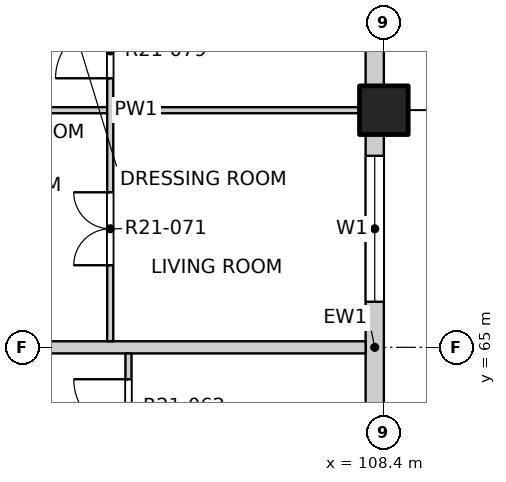
"""IFC4 building model, lengths in metres.
Left out: names, types, materials, properties, quantities, classifications, styles, units other than length and angle.
Written with IfcOpenShell. Run it as: python <this file> out.ifc"""

import sys

from ifc_helpers import new_model, si_unit, direction, frame, frame_2d, origin, origin_2d, place, context, subcontext, project, spatial, rectangle, extrude, element, fill, save


model = new_model("IFC4")
c1 = context("Model", 3, precision=1e-05, world=origin(), true_north=direction((0.0, 1.0)))
c2 = subcontext(c1, "Body", "Model", "MODEL_VIEW")
j1 = project(units=[si_unit("LENGTHUNIT", "METRE"), si_unit("PLANEANGLEUNIT", "RADIAN")], contexts=[c1])
p1 = place(None, origin())
s1 = spatial("IfcSite", under=j1, at=p1, CompositionType="ELEMENT")
p2 = place(p1, origin())
s2 = spatial("IfcBuilding", under=s1, at=p2, CompositionType="ELEMENT")
p3 = place(p2, frame((0.0, 0.0, 221.1)))
s3 = spatial("IfcBuildingStorey", under=s2, at=p3, CompositionType="ELEMENT", Elevation=221.1)
p4 = place(p3, frame((108.4, 68.9, -0.25), z_axis=(0.0, 0.0, 1.0), x_axis=(1.0, 0.0, 0.0)))
e1 = element("IfcColumn", 1, at=p4, inside=s3, PredefinedType="COLUMN", context=c2, shape_type="SweptSolid", body=[
    extrude(rectangle(XDim=0.8, YDim=0.8, at=origin_2d()), origin(), (0.0, 0.0, 1.0), 3.4),
])
p5 = place(p3, frame((108.25, 61.5, 0.0), z_axis=(0.0, 0.0, 1.0), x_axis=(0.0, 1.0, 0.0)))
e2 = element("IfcWall", 2, at=p5, inside=s3, PredefinedType="SOLIDWALL", context=c2, shape_type="SweptSolid", body=[
    extrude(rectangle(XDim=7.0, YDim=0.3, at=frame_2d((3.5, 0.0))), origin(), (0.0, 0.0, 1.0), 2.7),
])
p6 = place(p5, frame((0.65, 0.0, 0.0)))
e3 = element("IfcOpeningElement", 3, at=p6, cuts=e2, PredefinedType="OPENING", context=c2, shape_type="SweptSolid", body=[
    extrude(rectangle(XDim=1.8, YDim=2.4, at=frame_2d((0.9, 1.2))), frame((0.0, 0.16, 0.0), z_axis=(0.0, -1.0, 0.0), x_axis=(1.0, 0.0, 0.0)), (0.0, 0.0, 1.0), 0.32),
])
p7 = place(p5, frame((4.25, 0.0, 0.9)))
e4 = element("IfcOpeningElement", 4, at=p7, cuts=e2, PredefinedType="OPENING", context=c2, shape_type="SweptSolid", body=[
    extrude(rectangle(XDim=2.4, YDim=1.8, at=frame_2d((1.2, 0.9))), frame((0.0, 0.16, 0.0), z_axis=(0.0, -1.0, 0.0), x_axis=(1.0, 0.0, 0.0)), (0.0, 0.0, 1.0), 0.32),
])
p8 = place(p3, frame((108.25, 69.3, 0.0), z_axis=(0.0, 0.0, 1.0), x_axis=(0.0, 1.0, 0.0)))
e5 = element("IfcWall", 5, at=p8, inside=s3, PredefinedType="SOLIDWALL", context=c2, shape_type="SweptSolid", body=[
    extrude(rectangle(XDim=7.0, YDim=0.3, at=frame_2d((3.5, 0.0))), origin(), (0.0, 0.0, 1.0), 2.7),
])
p9 = place(p8, frame((0.65, 0.0, 0.0)))
e6 = element("IfcOpeningElement", 6, at=p9, cuts=e5, PredefinedType="OPENING", context=c2, shape_type="SweptSolid", body=[
    extrude(rectangle(XDim=1.8, YDim=2.4, at=frame_2d((0.9, 1.2))), frame((0.0, 0.16, 0.0), z_axis=(0.0, -1.0, 0.0), x_axis=(1.0, 0.0, 0.0)), (0.0, 0.0, 1.0), 0.32),
])
p10 = place(p8, frame((4.25, 0.0, 0.9)))
e7 = element("IfcOpeningElement", 7, at=p10, cuts=e5, PredefinedType="OPENING", context=c2, shape_type="SweptSolid", body=[
    extrude(rectangle(XDim=2.4, YDim=1.8, at=frame_2d((1.2, 0.9))), frame((0.0, 0.16, 0.0), z_axis=(0.0, -1.0, 0.0), x_axis=(1.0, 0.0, 0.0)), (0.0, 0.0, 1.0), 0.32),
])
p11 = place(p3, frame((96.6, 65.0, 0.0), z_axis=(0.0, 0.0, 1.0), x_axis=(1.0, 0.0, 0.0)))
e8 = element("IfcWall", 8, at=p11, inside=s3, PredefinedType="PARTITIONING", context=c2, shape_type="SweptSolid", body=[
    extrude(rectangle(XDim=11.5, YDim=0.2, at=frame_2d((5.75, 0.0))), origin(), (0.0, 0.0, 1.0), 3.15),
])
p12 = place(p3, frame((100.55, 68.9, 0.0), z_axis=(0.0, 0.0, 1.0), x_axis=(1.0, 0.0, 0.0)))
e9 = element("IfcWall", 9, at=p12, inside=s3, PredefinedType="PARTITIONING", context=c2, shape_type="SweptSolid", body=[
    extrude(rectangle(XDim=7.55, YDim=0.1, at=frame_2d((3.775, 0.0))), origin(), (0.0, 0.0, 1.0), 2.55),
])
p13 = place(p3, frame((103.9, 65.1, 0.0), z_axis=(0.0, 0.0, 1.0), x_axis=(0.0, 1.0, 0.0)))
e10 = element("IfcWall", 10, at=p13, inside=s3, PredefinedType="PARTITIONING", context=c2, shape_type="SweptSolid", body=[
    extrude(rectangle(XDim=11.5, YDim=0.1, at=frame_2d((5.75, 0.0))), origin(), (0.0, 0.0, 1.0), 3.15),
])
p14 = place(p13, frame((1.25, 0.0, 0.0)))
e11 = element("IfcOpeningElement", 11, at=p14, cuts=e10, PredefinedType="OPENING", context=c2, shape_type="SweptSolid", body=[
    extrude(rectangle(XDim=1.2, YDim=2.1, at=frame_2d((0.6, 1.05))), frame((0.0, 0.06, 0.0), z_axis=(0.0, -1.0, 0.0), x_axis=(1.0, 0.0, 0.0)), (0.0, 0.0, 1.0), 0.12),
])
p15 = place(p13, frame((4.325, 0.0, 0.0)))
e12 = element("IfcOpeningElement", 12, at=p15, cuts=e10, PredefinedType="OPENING", context=c2, shape_type="SweptSolid", body=[
    extrude(rectangle(XDim=0.9, YDim=2.1, at=frame_2d((0.45, 1.05))), frame((0.0, 0.06, 0.0), z_axis=(0.0, -1.0, 0.0), x_axis=(1.0, 0.0, 0.0)), (0.0, 0.0, 1.0), 0.12),
])
p16 = place(p13, frame((6.275, 0.0, 0.0)))
e13 = element("IfcOpeningElement", 13, at=p16, cuts=e10, PredefinedType="OPENING", context=c2, shape_type="SweptSolid", body=[
    extrude(rectangle(XDim=0.9, YDim=2.1, at=frame_2d((0.45, 1.05))), frame((0.0, 0.06, 0.0), z_axis=(0.0, -1.0, 0.0), x_axis=(1.0, 0.0, 0.0)), (0.0, 0.0, 1.0), 0.12),
])
p17 = place(p13, frame((8.225, 0.0, 0.0)))
e14 = element("IfcOpeningElement", 14, at=p17, cuts=e10, PredefinedType="OPENING", context=c2, shape_type="SweptSolid", body=[
    extrude(rectangle(XDim=0.9, YDim=2.1, at=frame_2d((0.45, 1.05))), frame((0.0, 0.06, 0.0), z_axis=(0.0, -1.0, 0.0), x_axis=(1.0, 0.0, 0.0)), (0.0, 0.0, 1.0), 0.12),
])
p18 = place(p13, frame((10.175, 0.0, 0.0)))
e15 = element("IfcOpeningElement", 15, at=p18, cuts=e10, PredefinedType="OPENING", context=c2, shape_type="SweptSolid", body=[
    extrude(rectangle(XDim=0.9, YDim=2.1, at=frame_2d((0.45, 1.05))), frame((0.0, 0.06, 0.0), z_axis=(0.0, -1.0, 0.0), x_axis=(1.0, 0.0, 0.0)), (0.0, 0.0, 1.0), 0.12),
])
p19 = place(p3, frame((104.2, 41.9, 0.0), z_axis=(0.0, 0.0, 1.0), x_axis=(0.0, 1.0, 0.0)))
e16 = element("IfcWall", 16, at=p19, inside=s3, PredefinedType="PARTITIONING", context=c2, shape_type="SweptSolid", body=[
    extrude(rectangle(XDim=23.0, YDim=0.1, at=frame_2d((11.5, 0.0))), origin(), (0.0, 0.0, 1.0), 3.15),
])
p20 = place(p19, frame((1.05, 0.0, 0.0)))
e17 = element("IfcOpeningElement", 17, at=p20, cuts=e16, PredefinedType="OPENING", context=c2, shape_type="SweptSolid", body=[
    extrude(rectangle(XDim=1.2, YDim=2.1, at=frame_2d((0.6, 1.05))), frame((0.0, 0.06, 0.0), z_axis=(0.0, -1.0, 0.0), x_axis=(1.0, 0.0, 0.0)), (0.0, 0.0, 1.0), 0.12),
])
p21 = place(p19, frame((4.125, 0.0, 0.0)))
e18 = element("IfcOpeningElement", 18, at=p21, cuts=e16, PredefinedType="OPENING", context=c2, shape_type="SweptSolid", body=[
    extrude(rectangle(XDim=0.9, YDim=2.1, at=frame_2d((0.45, 1.05))), frame((0.0, 0.06, 0.0), z_axis=(0.0, -1.0, 0.0), x_axis=(1.0, 0.0, 0.0)), (0.0, 0.0, 1.0), 0.12),
])
p22 = place(p19, frame((6.075, 0.0, 0.0)))
e19 = element("IfcOpeningElement", 19, at=p22, cuts=e16, PredefinedType="OPENING", context=c2, shape_type="SweptSolid", body=[
    extrude(rectangle(XDim=0.9, YDim=2.1, at=frame_2d((0.45, 1.05))), frame((0.0, 0.06, 0.0), z_axis=(0.0, -1.0, 0.0), x_axis=(1.0, 0.0, 0.0)), (0.0, 0.0, 1.0), 0.12),
])
p23 = place(p19, frame((8.85, 0.0, 0.0)))
e20 = element("IfcOpeningElement", 20, at=p23, cuts=e16, PredefinedType="OPENING", context=c2, shape_type="SweptSolid", body=[
    extrude(rectangle(XDim=1.2, YDim=2.1, at=frame_2d((0.6, 1.05))), frame((0.0, 0.06, 0.0), z_axis=(0.0, -1.0, 0.0), x_axis=(1.0, 0.0, 0.0)), (0.0, 0.0, 1.0), 0.12),
])
p24 = place(p19, frame((11.925, 0.0, 0.0)))
e21 = element("IfcOpeningElement", 21, at=p24, cuts=e16, PredefinedType="OPENING", context=c2, shape_type="SweptSolid", body=[
    extrude(rectangle(XDim=0.9, YDim=2.1, at=frame_2d((0.45, 1.05))), frame((0.0, 0.06, 0.0), z_axis=(0.0, -1.0, 0.0), x_axis=(1.0, 0.0, 0.0)), (0.0, 0.0, 1.0), 0.12),
])
p25 = place(p19, frame((13.875, 0.0, 0.0)))
e22 = element("IfcOpeningElement", 22, at=p25, cuts=e16, PredefinedType="OPENING", context=c2, shape_type="SweptSolid", body=[
    extrude(rectangle(XDim=0.9, YDim=2.1, at=frame_2d((0.45, 1.05))), frame((0.0, 0.06, 0.0), z_axis=(0.0, -1.0, 0.0), x_axis=(1.0, 0.0, 0.0)), (0.0, 0.0, 1.0), 0.12),
])
p26 = place(p19, frame((16.65, 0.0, 0.0)))
e23 = element("IfcOpeningElement", 23, at=p26, cuts=e16, PredefinedType="OPENING", context=c2, shape_type="SweptSolid", body=[
    extrude(rectangle(XDim=1.2, YDim=2.1, at=frame_2d((0.6, 1.05))), frame((0.0, 0.06, 0.0), z_axis=(0.0, -1.0, 0.0), x_axis=(1.0, 0.0, 0.0)), (0.0, 0.0, 1.0), 0.12),
])
p27 = place(p19, frame((19.725, 0.0, 0.0)))
e24 = element("IfcOpeningElement", 24, at=p27, cuts=e16, PredefinedType="OPENING", context=c2, shape_type="SweptSolid", body=[
    extrude(rectangle(XDim=0.9, YDim=2.1, at=frame_2d((0.45, 1.05))), frame((0.0, 0.06, 0.0), z_axis=(0.0, -1.0, 0.0), x_axis=(1.0, 0.0, 0.0)), (0.0, 0.0, 1.0), 0.12),
])
p28 = place(p19, frame((21.675, 0.0, 0.0)))
e25 = element("IfcOpeningElement", 25, at=p28, cuts=e16, PredefinedType="OPENING", context=c2, shape_type="SweptSolid", body=[
    extrude(rectangle(XDim=0.9, YDim=2.1, at=frame_2d((0.45, 1.05))), frame((0.0, 0.06, 0.0), z_axis=(0.0, -1.0, 0.0), x_axis=(1.0, 0.0, 0.0)), (0.0, 0.0, 1.0), 0.12),
])
p29 = place(p7, origin())
e26 = element("IfcWindow", 26, at=p29, inside=s3, PartitioningType="DOUBLE_PANEL_VERTICAL", PredefinedType="WINDOW", context=c2, shape_type="SweptSolid", body=[
    extrude(rectangle(XDim=2.4, YDim=1.8, at=frame_2d((1.2, 0.9))), frame((0.0, 0.03, 0.0), z_axis=(0.0, -1.0, 0.0), x_axis=(1.0, 0.0, 0.0)), (0.0, 0.0, 1.0), 0.06),
])
fill(e4, e26)
p30 = place(p28, origin())
e27 = element("IfcDoor", 27, at=p30, inside=s3, OperationType="SINGLE_SWING_RIGHT", PredefinedType="DOOR", context=c2, shape_type="SweptSolid", body=[
    extrude(rectangle(XDim=0.9, YDim=2.1, at=frame_2d((0.45, 1.05))), frame((0.0, 0.025, 0.0), z_axis=(0.0, -1.0, 0.0), x_axis=(1.0, 0.0, 0.0)), (0.0, 0.0, 1.0), 0.05),
])
fill(e25, e27)
p31 = place(p14, origin())
e28 = element("IfcDoor", 28, at=p31, inside=s3, OperationType="DOUBLE_DOOR_SINGLE_SWING", PredefinedType="DOOR", context=c2, shape_type="SweptSolid", body=[
    extrude(rectangle(XDim=1.2, YDim=2.1, at=frame_2d((0.6, 1.05))), frame((0.0, 0.025, 0.0), z_axis=(0.0, -1.0, 0.0), x_axis=(1.0, 0.0, 0.0)), (0.0, 0.0, 1.0), 0.05),
])
fill(e11, e28)
p32 = place(p15, origin())
e29 = element("IfcDoor", 29, at=p32, inside=s3, OperationType="SINGLE_SWING_LEFT", PredefinedType="DOOR", context=c2, shape_type="SweptSolid", body=[
    extrude(rectangle(XDim=0.9, YDim=2.1, at=frame_2d((0.45, 1.05))), frame((0.0, 0.025, 0.0), z_axis=(0.0, -1.0, 0.0), x_axis=(1.0, 0.0, 0.0)), (0.0, 0.0, 1.0), 0.05),
])
fill(e12, e29)
save(model, sys.argv[1])
